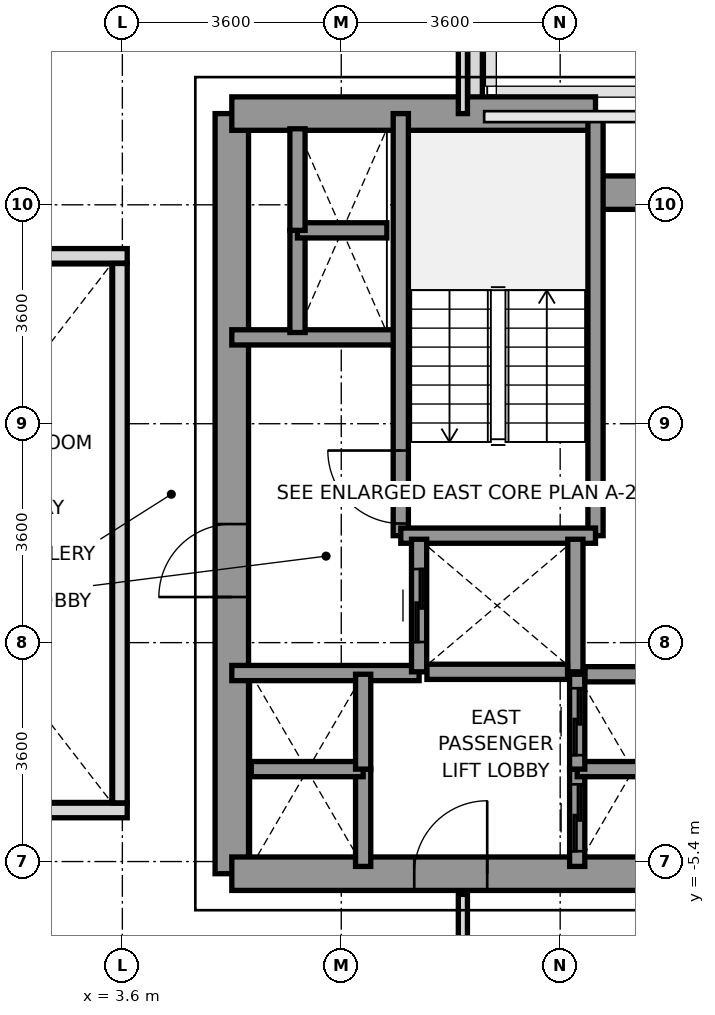
"""IFC4 building model, lengths in metres.
Left out: names, types, materials, properties, quantities, classifications, styles, units other than length and angle.
Written with IfcOpenShell. Run it as: python <this file> out.ifc"""

import sys

from ifc_helpers import new_model, si_unit, direction, frame, frame_2d, origin, place, context, subcontext, project, spatial, rectangle, extrude, source, transform, mapped, element, fill, save


model = new_model("IFC4")
c1 = context("Model", 3, precision=1e-05, world=origin(), true_north=direction((0.0, 1.0)))
c2 = subcontext(c1, "Body", "Model", "MODEL_VIEW")
j1 = project(units=[si_unit("LENGTHUNIT", "METRE"), si_unit("PLANEANGLEUNIT", "RADIAN")], contexts=[c1])
p1 = place(None, origin())
s1 = spatial("IfcSite", under=j1, at=p1, CompositionType="ELEMENT")
p2 = place(p1, origin())
s2 = spatial("IfcBuilding", under=s1, at=p2, CompositionType="ELEMENT")
p3 = place(p2, frame((0.0, 0.0, 40.8)))
s3 = spatial("IfcBuildingStorey", under=s2, at=p3, CompositionType="ELEMENT", Elevation=40.8)
p4 = place(p3, frame((9.4, 8.397, 0.0), z_axis=(0.0, 0.0, 1.0), x_axis=(0.0, -1.0, 0.0)))
e1 = element("IfcWall", 1, at=p4, inside=s3, PredefinedType="PARAPET", context=c2, shape_type="SweptSolid", body=[
    extrude(rectangle(XDim=1.444, YDim=0.24, at=frame_2d((0.722, 0.0))), origin(), (0.0, 0.0, 1.0), 1.15),
])
p5 = place(p3, frame((5.4, -5.6, 0.0), z_axis=(0.0, 0.0, 1.0), x_axis=(0.0, 1.0, 0.0)))
e2 = element("IfcWall", 2, at=p5, inside=s3, PredefinedType="SHEAR", context=c2, shape_type="SweptSolid", body=[
    extrude(rectangle(XDim=12.5, YDim=0.55, at=frame_2d((6.25, 0.0))), origin(), (0.0, 0.0, 1.0), 3.2),
])
p6 = place(p5, frame((4.55, 0.0, 0.0)))
e3 = element("IfcOpeningElement", 3, at=p6, cuts=e2, PredefinedType="OPENING", context=c2, shape_type="SweptSolid", body=[
    extrude(rectangle(XDim=1.2, YDim=2.2, at=frame_2d((0.6, 1.1))), frame((0.0, 0.285, 0.0), z_axis=(0.0, -1.0, 0.0), x_axis=(1.0, 0.0, 0.0)), (0.0, 0.0, 1.0), 0.57),
])
p7 = place(p3, frame((5.4, 6.9, 0.0), z_axis=(0.0, 0.0, 1.0), x_axis=(1.0, 0.0, 0.0)))
e4 = element("IfcWall", 4, at=p7, inside=s3, PredefinedType="SHEAR", context=c2, shape_type="SweptSolid", body=[
    extrude(rectangle(XDim=5.981, YDim=0.55, at=frame_2d((2.991, 0.0))), origin(), (0.0, 0.0, 1.0), 3.2),
])
p8 = place(p3, frame((11.381, 5.6, 0.0), z_axis=(0.0, 0.0, 1.0), x_axis=(1.0, 0.0, 0.0)))
e5 = element("IfcWall", 5, at=p8, inside=s3, PredefinedType="SHEAR", context=c2, shape_type="SweptSolid", body=[
    extrude(rectangle(XDim=1.819, YDim=0.55, at=frame_2d((0.909, 0.0))), origin(), (0.0, 0.0, 1.0), 3.2),
])
p9 = place(p3, frame((5.4, -5.6, 0.0), z_axis=(0.0, 0.0, 1.0), x_axis=(1.0, 0.0, 0.0)))
e6 = element("IfcWall", 6, at=p9, inside=s3, PredefinedType="SHEAR", context=c2, shape_type="SweptSolid", body=[
    extrude(rectangle(XDim=7.8, YDim=0.55, at=frame_2d((3.9, 0.0))), origin(), (0.0, 0.0, 1.0), 3.2),
])
p10 = place(p9, frame((3.0, 0.0, 0.0)))
e7 = element("IfcOpeningElement", 7, at=p10, cuts=e6, PredefinedType="OPENING", context=c2, shape_type="SweptSolid", body=[
    extrude(rectangle(XDim=1.2, YDim=2.2, at=frame_2d((0.6, 1.1))), frame((0.0, 0.285, 0.0), z_axis=(0.0, -1.0, 0.0), x_axis=(1.0, 0.0, 0.0)), (0.0, 0.0, 1.0), 0.57),
])
p11 = place(p3, frame((5.4, 3.22, 0.0), z_axis=(0.0, 0.0, 1.0), x_axis=(1.0, 0.0, 0.0)))
e8 = element("IfcWall", 8, at=p11, inside=s3, PredefinedType="SOLIDWALL", context=c2, shape_type="SweptSolid", body=[
    extrude(rectangle(XDim=2.78, YDim=0.25, at=frame_2d((1.39, 0.0))), origin(), (0.0, 0.0, 1.0), 3.2),
])
p12 = place(p3, frame((5.4, -2.3, 0.0), z_axis=(0.0, 0.0, 1.0), x_axis=(1.0, 0.0, 0.0)))
e9 = element("IfcWall", 9, at=p12, inside=s3, PredefinedType="SOLIDWALL", context=c2, shape_type="SweptSolid", body=[
    extrude(rectangle(XDim=3.08, YDim=0.25, at=frame_2d((1.54, 0.0))), origin(), (0.0, 0.0, 1.0), 3.2),
])
p13 = place(p3, frame((8.179, -0.041, 0.0), z_axis=(0.0, 0.0, 1.0), x_axis=(0.0, 1.0, 0.0)))
e10 = element("IfcWall", 10, at=p13, inside=s3, PredefinedType="SOLIDWALL", context=c2, shape_type="SweptSolid", body=[
    extrude(rectangle(XDim=6.941, YDim=0.25, at=frame_2d((3.47, 0.0))), origin(), (0.0, 0.0, 1.0), 3.2),
])
p14 = place(p13, frame((0.2, 0.0, 0.0)))
e11 = element("IfcOpeningElement", 11, at=p14, cuts=e10, PredefinedType="OPENING", context=c2, shape_type="SweptSolid", body=[
    extrude(rectangle(XDim=1.2, YDim=2.2, at=frame_2d((0.6, 1.1))), frame((0.0, 0.135, 0.0), z_axis=(0.0, -1.0, 0.0), x_axis=(1.0, 0.0, 0.0)), (0.0, 0.0, 1.0), 0.27),
])
p15 = place(p3, frame((11.381, -0.041, 0.0), z_axis=(0.0, 0.0, 1.0), x_axis=(0.0, 1.0, 0.0)))
e12 = element("IfcWall", 12, at=p15, inside=s3, PredefinedType="SOLIDWALL", context=c2, shape_type="SweptSolid", body=[
    extrude(rectangle(XDim=6.941, YDim=0.25, at=frame_2d((3.47, 0.0))), origin(), (0.0, 0.0, 1.0), 3.2),
])
p16 = place(p3, frame((8.179, -0.041, 0.0), z_axis=(0.0, 0.0, 1.0), x_axis=(1.0, 0.0, 0.0)))
e13 = element("IfcWall", 13, at=p16, inside=s3, PredefinedType="SOLIDWALL", context=c2, shape_type="SweptSolid", body=[
    extrude(rectangle(XDim=3.202, YDim=0.25, at=frame_2d((1.601, 0.0))), origin(), (0.0, 0.0, 1.0), 3.2),
])
p17 = place(p3, frame((8.48, -2.28, 0.0), z_axis=(0.0, 0.0, 1.0), x_axis=(0.0, 1.0, 0.0)))
e14 = element("IfcWall", 14, at=p17, inside=s3, PredefinedType="SOLIDWALL", context=c2, shape_type="SweptSolid", body=[
    extrude(rectangle(XDim=2.18, YDim=0.25, at=frame_2d((1.09, 0.0))), origin(), (0.0, 0.0, 1.0), 3.2),
])
p18 = place(p17, frame((0.49, 0.0, 0.0)))
e15 = element("IfcOpeningElement", 15, at=p18, cuts=e14, PredefinedType="OPENING", context=c2, shape_type="SweptSolid", body=[
    extrude(rectangle(XDim=1.2, YDim=2.2, at=frame_2d((0.6, 1.1))), frame((0.0, 0.135, 0.0), z_axis=(0.0, -1.0, 0.0), x_axis=(1.0, 0.0, 0.0)), (0.0, 0.0, 1.0), 0.27),
])
p19 = place(p3, frame((11.05, -2.28, 0.0), z_axis=(0.0, 0.0, 1.0), x_axis=(0.0, 1.0, 0.0)))
e16 = element("IfcWall", 16, at=p19, inside=s3, PredefinedType="SOLIDWALL", context=c2, shape_type="SweptSolid", body=[
    extrude(rectangle(XDim=2.18, YDim=0.25, at=frame_2d((1.09, 0.0))), origin(), (0.0, 0.0, 1.0), 3.2),
])
p20 = place(p3, frame((8.609, -2.28, 0.0), z_axis=(0.0, 0.0, 1.0), x_axis=(1.0, 0.0, 0.0)))
e17 = element("IfcWall", 17, at=p20, inside=s3, PredefinedType="SOLIDWALL", context=c2, shape_type="SweptSolid", body=[
    extrude(rectangle(XDim=2.312, YDim=0.25, at=frame_2d((1.156, 0.0))), origin(), (0.0, 0.0, 1.0), 3.2),
])
p21 = place(p3, frame((11.08, -5.48, 0.0), z_axis=(0.0, 0.0, 1.0), x_axis=(0.0, 1.0, 0.0)))
e18 = element("IfcWall", 18, at=p21, inside=s3, PredefinedType="SOLIDWALL", context=c2, shape_type="SweptSolid", body=[
    extrude(rectangle(XDim=1.6, YDim=0.25, at=frame_2d((0.8, 0.0))), origin(), (0.0, 0.0, 1.0), 3.2),
])
p22 = place(p21, frame((0.25, 0.0, 0.0)))
e19 = element("IfcOpeningElement", 19, at=p22, cuts=e18, PredefinedType="OPENING", context=c2, shape_type="SweptSolid", body=[
    extrude(rectangle(XDim=1.1, YDim=2.2, at=frame_2d((0.55, 1.1))), frame((0.0, 0.135, 0.0), z_axis=(0.0, -1.0, 0.0), x_axis=(1.0, 0.0, 0.0)), (0.0, 0.0, 1.0), 0.27),
])
p23 = place(p3, frame((11.08, -3.88, 0.0), z_axis=(0.0, 0.0, 1.0), x_axis=(1.0, 0.0, 0.0)))
e20 = element("IfcWall", 20, at=p23, inside=s3, PredefinedType="SOLIDWALL", context=c2, shape_type="SweptSolid", body=[
    extrude(rectangle(XDim=1.84, YDim=0.25, at=frame_2d((0.92, 0.0))), origin(), (0.0, 0.0, 1.0), 3.2),
])
p24 = place(p3, frame((11.08, -3.88, 0.0), z_axis=(0.0, 0.0, 1.0), x_axis=(0.0, 1.0, 0.0)))
e21 = element("IfcWall", 21, at=p24, inside=s3, PredefinedType="SOLIDWALL", context=c2, shape_type="SweptSolid", body=[
    extrude(rectangle(XDim=1.56, YDim=0.25, at=frame_2d((0.78, 0.0))), origin(), (0.0, 0.0, 1.0), 3.2),
])
p25 = place(p24, frame((0.23, 0.0, 0.0)))
e22 = element("IfcOpeningElement", 22, at=p25, cuts=e21, PredefinedType="OPENING", context=c2, shape_type="SweptSolid", body=[
    extrude(rectangle(XDim=1.1, YDim=2.2, at=frame_2d((0.55, 1.1))), frame((0.0, 0.135, 0.0), z_axis=(0.0, -1.0, 0.0), x_axis=(1.0, 0.0, 0.0)), (0.0, 0.0, 1.0), 0.27),
])
p26 = place(p3, frame((11.209, -2.32, 0.0), z_axis=(0.0, 0.0, 1.0), x_axis=(1.0, 0.0, 0.0)))
e23 = element("IfcWall", 23, at=p26, inside=s3, PredefinedType="SOLIDWALL", context=c2, shape_type="SweptSolid", body=[
    extrude(rectangle(XDim=1.582, YDim=0.25, at=frame_2d((0.791, 0.0))), origin(), (0.0, 0.0, 1.0), 3.2),
])
p27 = place(p3, frame((7.56, -5.48, 0.0), z_axis=(0.0, 0.0, 1.0), x_axis=(0.0, 1.0, 0.0)))
e24 = element("IfcWall", 24, at=p27, inside=s3, PredefinedType="SOLIDWALL", context=c2, shape_type="SweptSolid", body=[
    extrude(rectangle(XDim=1.6, YDim=0.25, at=frame_2d((0.8, 0.0))), origin(), (0.0, 0.0, 1.0), 3.2),
])
p28 = place(p3, frame((5.72, -3.88, 0.0), z_axis=(0.0, 0.0, 1.0), x_axis=(1.0, 0.0, 0.0)))
e25 = element("IfcWall", 25, at=p28, inside=s3, PredefinedType="SOLIDWALL", context=c2, shape_type="SweptSolid", body=[
    extrude(rectangle(XDim=1.84, YDim=0.25, at=frame_2d((0.92, 0.0))), origin(), (0.0, 0.0, 1.0), 3.2),
])
p29 = place(p3, frame((7.56, -3.88, 0.0), z_axis=(0.0, 0.0, 1.0), x_axis=(0.0, 1.0, 0.0)))
e26 = element("IfcWall", 26, at=p29, inside=s3, PredefinedType="SOLIDWALL", context=c2, shape_type="SweptSolid", body=[
    extrude(rectangle(XDim=1.56, YDim=0.25, at=frame_2d((0.78, 0.0))), origin(), (0.0, 0.0, 1.0), 3.2),
])
p30 = place(p3, frame((6.48, 3.3, 0.0), z_axis=(0.0, 0.0, 1.0), x_axis=(0.0, 1.0, 0.0)))
e27 = element("IfcWall", 27, at=p30, inside=s3, PredefinedType="SOLIDWALL", context=c2, shape_type="SweptSolid", body=[
    extrude(rectangle(XDim=1.68, YDim=0.25, at=frame_2d((0.84, 0.0))), origin(), (0.0, 0.0, 1.0), 3.2),
])
p31 = place(p3, frame((6.48, 4.98, 0.0), z_axis=(0.0, 0.0, 1.0), x_axis=(1.0, 0.0, 0.0)))
e28 = element("IfcWall", 28, at=p31, inside=s3, PredefinedType="SOLIDWALL", context=c2, shape_type="SweptSolid", body=[
    extrude(rectangle(XDim=1.47, YDim=0.25, at=frame_2d((0.735, 0.0))), origin(), (0.0, 0.0, 1.0), 3.2),
])
p32 = place(p3, frame((6.48, 4.98, 0.0), z_axis=(0.0, 0.0, 1.0), x_axis=(0.0, 1.0, 0.0)))
e29 = element("IfcWall", 29, at=p32, inside=s3, PredefinedType="SOLIDWALL", context=c2, shape_type="SweptSolid", body=[
    extrude(rectangle(XDim=1.67, YDim=0.25, at=frame_2d((0.835, 0.0))), origin(), (0.0, 0.0, 1.0), 3.2),
])
p33 = place(p3, frame((9.2, 6.9, 0.0), z_axis=(0.0, 0.0, 1.0), x_axis=(0.0, 1.0, 0.0)))
e30 = element("IfcWall", 30, at=p33, inside=s3, PredefinedType="PARTITIONING", context=c2, shape_type="SweptSolid", body=[
    extrude(rectangle(XDim=8.78, YDim=0.15, at=frame_2d((4.39, 0.0))), origin(), (0.0, 0.0, 1.0), 2.71),
])
p34 = place(p3, frame((9.2, -15.68, 0.0), z_axis=(0.0, 0.0, 1.0), x_axis=(0.0, 1.0, 0.0)))
e31 = element("IfcWall", 31, at=p34, inside=s3, PredefinedType="PARTITIONING", context=c2, shape_type="SweptSolid", body=[
    extrude(rectangle(XDim=9.74, YDim=0.15, at=frame_2d((4.87, 0.0))), origin(), (0.0, 0.0, 1.0), 2.71),
])
for number, where, z_axis, x_axis in (
    (32, (-3.68, -4.56, 0.0), (0.0, 0.0, 1.0), (1.0, 0.0, 0.0)),
    (33, (-3.68, 4.56, 0.0), (0.0, 0.0, 1.0), (1.0, 0.0, 0.0)),
):
    element("IfcWall", number, at=place(p3, frame(where, z_axis=z_axis, x_axis=x_axis)), inside=s3, PredefinedType="PARAPET", context=c2, shape_type="SweptSolid", body=[
        extrude(rectangle(XDim=7.36, YDim=0.24, at=frame_2d((3.68, 0.0))), origin(), (0.0, 0.0, 1.0), 1.15),
    ])
p35 = place(p3, frame((3.56, -4.435, 0.0), z_axis=(0.0, 0.0, 1.0), x_axis=(0.0, 1.0, 0.0)))
e34 = element("IfcWall", 34, at=p35, inside=s3, PredefinedType="PARAPET", context=c2, shape_type="SweptSolid", body=[
    extrude(rectangle(XDim=8.87, YDim=0.24, at=frame_2d((4.435, 0.0))), origin(), (0.0, 0.0, 1.0), 1.15),
])
m1 = source(origin(), c2, "Body", "SweptSolid", [
    extrude(rectangle(XDim=1.2, YDim=2.2, at=frame_2d((0.6, 1.1))), frame((0.0, 0.025, 0.0), z_axis=(0.0, -1.0, 0.0), x_axis=(1.0, 0.0, 0.0)), (0.0, 0.0, 1.0), 0.05),
])
p36 = place(p14, origin())
e35 = element("IfcDoor", 35, at=p36, inside=s3, OperationType="SINGLE_SWING_RIGHT", PredefinedType="DOOR", context=c2, shape_type="MappedRepresentation", body=[
    mapped(m1, transform((0.0, 0.0, 0.0), x_axis=(1.0, 0.0, 0.0), y_axis=(0.0, 1.0, 0.0), z_axis=(0.0, 0.0, 1.0), scale=1.0)),
])
fill(e11, e35)
p37 = place(p6, origin())
e36 = element("IfcDoor", 36, at=p37, inside=s3, OperationType="SINGLE_SWING_LEFT", PredefinedType="DOOR", context=c2, shape_type="MappedRepresentation", body=[
    mapped(m1, transform((0.0, 0.0, 0.0), x_axis=(1.0, 0.0, 0.0), y_axis=(0.0, 1.0, 0.0), z_axis=(0.0, 0.0, 1.0), scale=1.0)),
])
fill(e3, e36)
p38 = place(p10, origin())
e37 = element("IfcDoor", 37, at=p38, inside=s3, OperationType="SINGLE_SWING_RIGHT", PredefinedType="DOOR", context=c2, shape_type="MappedRepresentation", body=[
    mapped(m1, transform((0.0, 0.0, 0.0), x_axis=(1.0, 0.0, 0.0), y_axis=(0.0, 1.0, 0.0), z_axis=(0.0, 0.0, 1.0), scale=1.0)),
])
fill(e7, e37)
p39 = place(p18, origin())
e38 = element("IfcDoor", 38, at=p39, inside=s3, OperationType="SLIDING_TO_RIGHT", PredefinedType="DOOR", context=c2, shape_type="MappedRepresentation", body=[
    mapped(m1, transform((0.0, 0.0, 0.0), x_axis=(1.0, 0.0, 0.0), y_axis=(0.0, 1.0, 0.0), z_axis=(0.0, 0.0, 1.0), scale=1.0)),
])
fill(e15, e38)
m2 = source(origin(), c2, "Body", "SweptSolid", [
    extrude(rectangle(XDim=1.1, YDim=2.2, at=frame_2d((0.55, 1.1))), frame((0.0, 0.025, 0.0), z_axis=(0.0, -1.0, 0.0), x_axis=(1.0, 0.0, 0.0)), (0.0, 0.0, 1.0), 0.05),
])
p40 = place(p22, origin())
e39 = element("IfcDoor", 39, at=p40, inside=s3, OperationType="SLIDING_TO_LEFT", PredefinedType="DOOR", context=c2, shape_type="MappedRepresentation", body=[
    mapped(m2, transform((0.0, 0.0, 0.0), x_axis=(1.0, 0.0, 0.0), y_axis=(0.0, 1.0, 0.0), z_axis=(0.0, 0.0, 1.0), scale=1.0)),
])
fill(e19, e39)
p41 = place(p25, origin())
e40 = element("IfcDoor", 40, at=p41, inside=s3, OperationType="SLIDING_TO_LEFT", PredefinedType="DOOR", context=c2, shape_type="MappedRepresentation", body=[
    mapped(m2, transform((0.0, 0.0, 0.0), x_axis=(1.0, 0.0, 0.0), y_axis=(0.0, 1.0, 0.0), z_axis=(0.0, 0.0, 1.0), scale=1.0)),
])
fill(e22, e40)
save(model, sys.argv[1])
